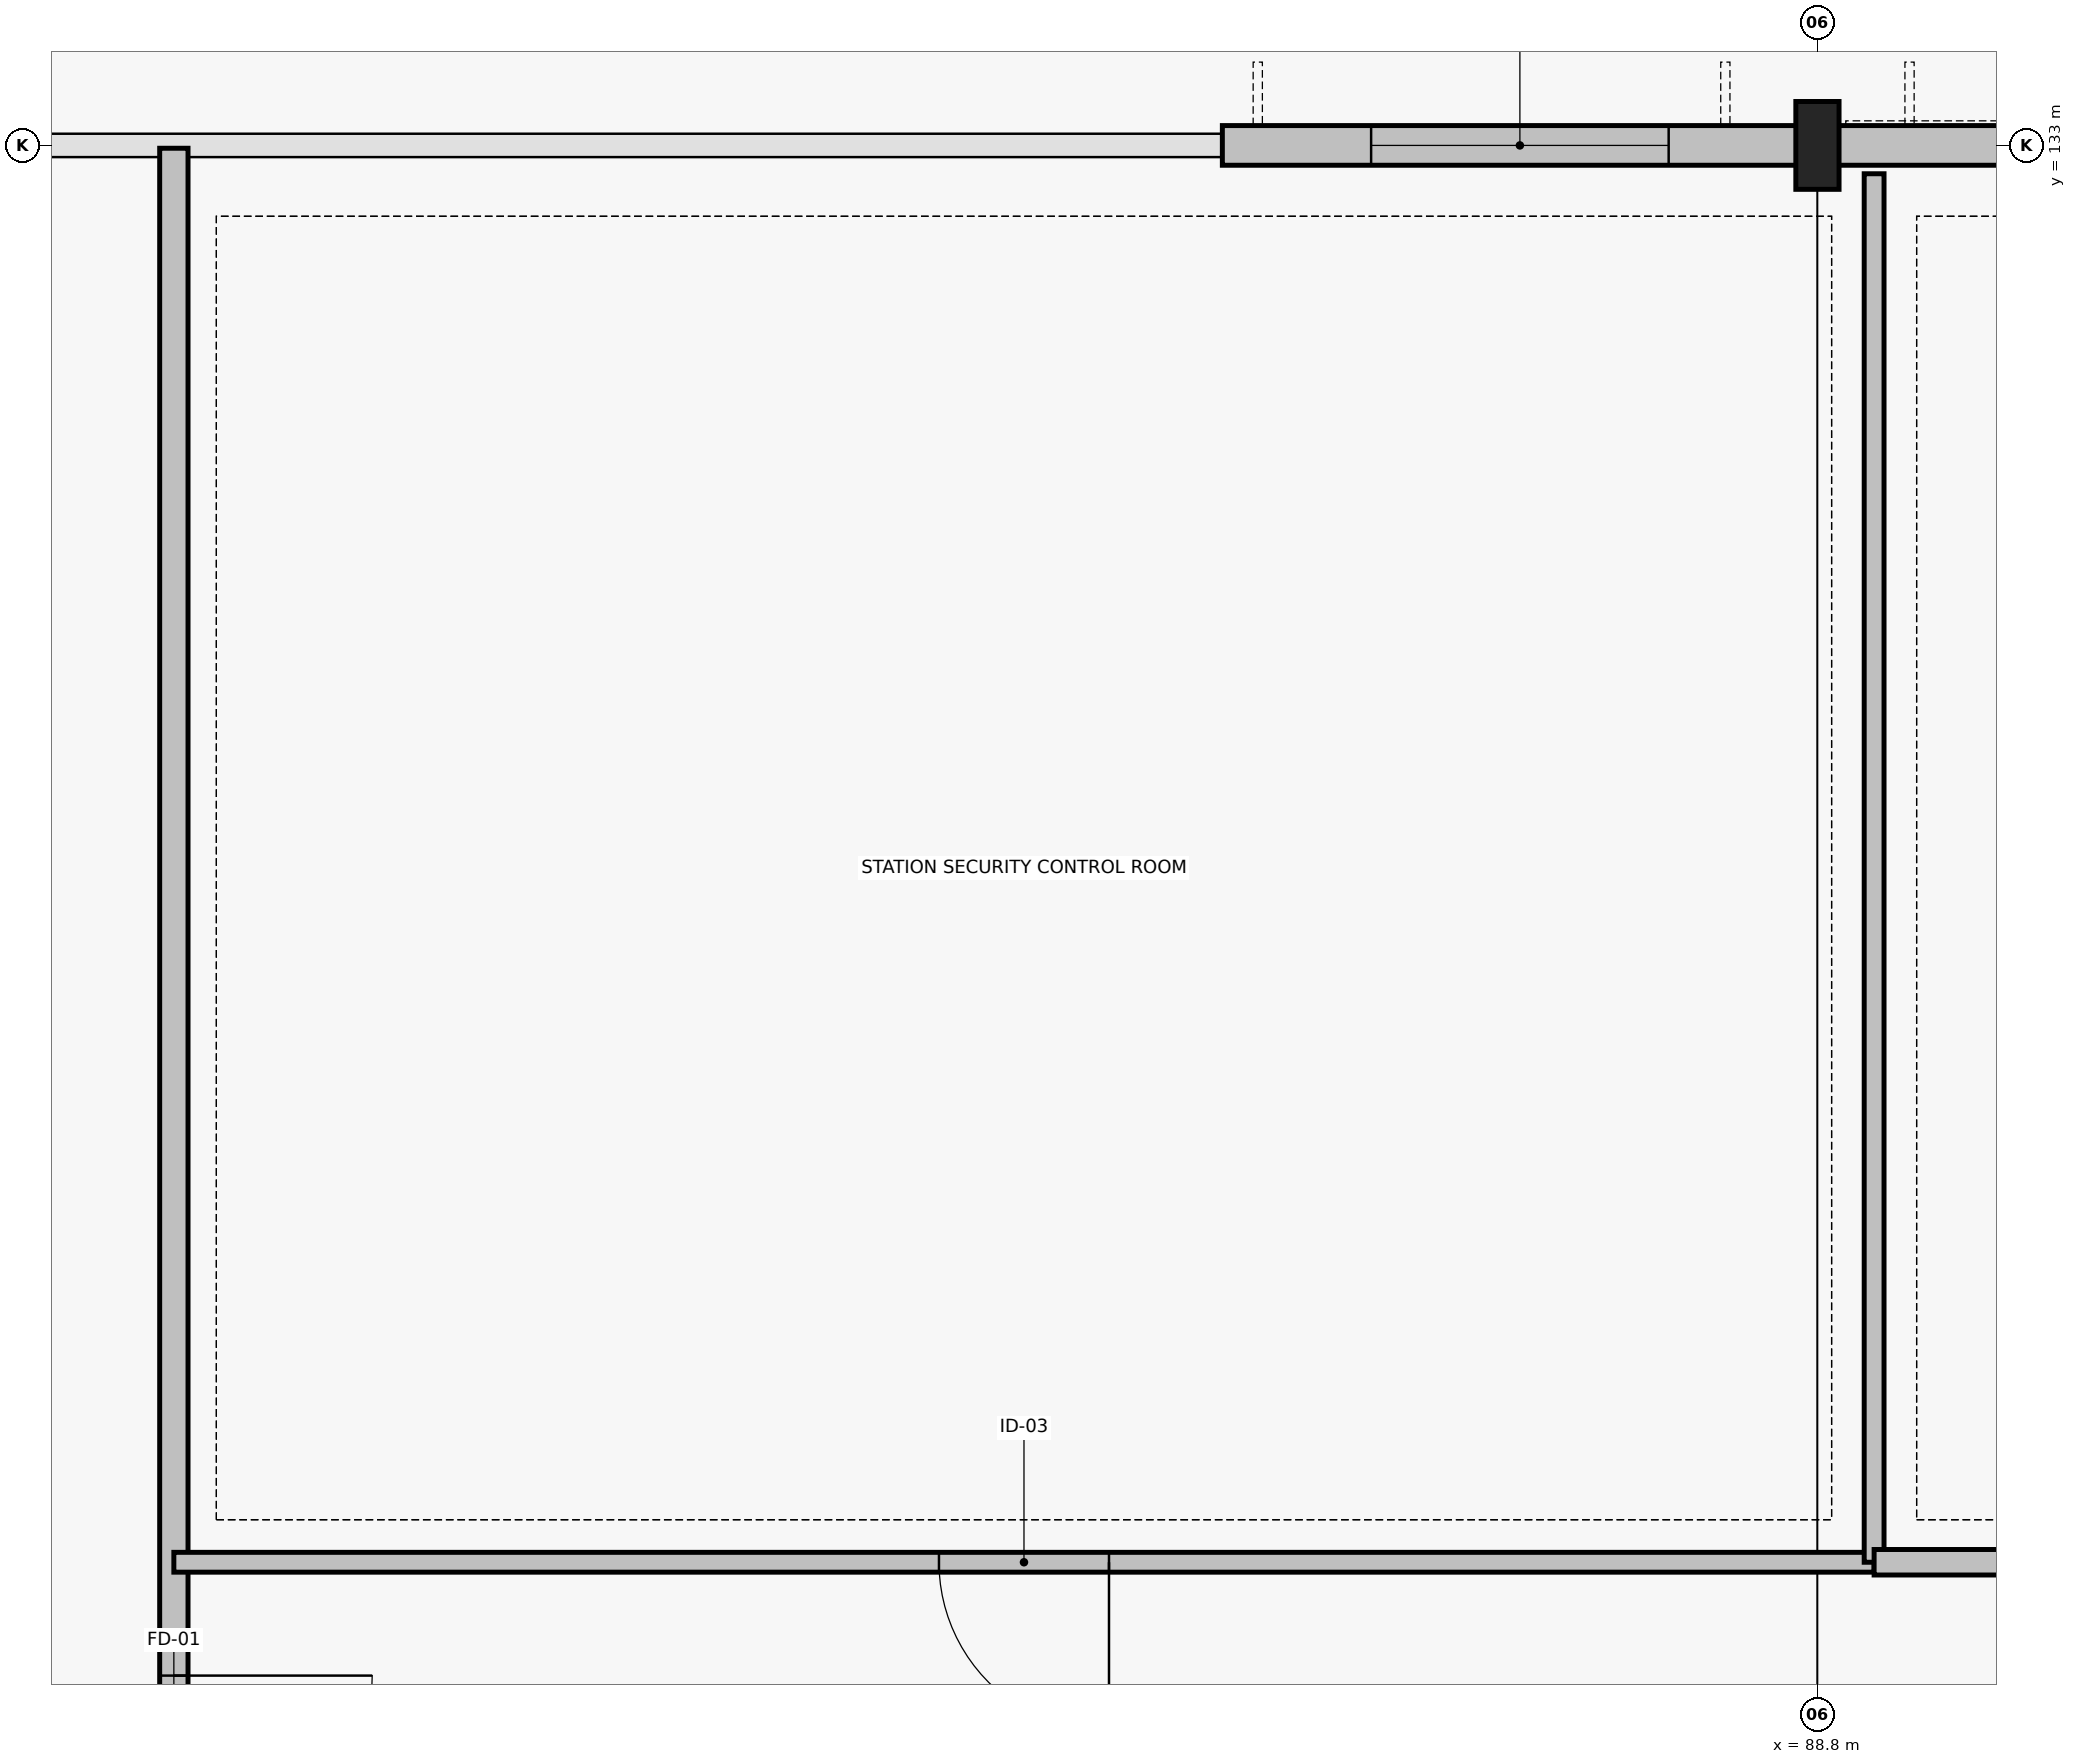
"""IFC4 building model, lengths in metres.
Left out: names, types, materials, properties, quantities, classifications, styles, units other than length and angle.
Written with IfcOpenShell. Run it as: python <this file> out.ifc"""

import sys

from ifc_helpers import new_model, si_unit, direction, frame, frame_2d, origin, origin_2d, place, context, subcontext, project, spatial, rectangle, i_section, extrude, element, fill, save


model = new_model("IFC4")
c1 = context("Model", 3, precision=1e-05, world=origin(), true_north=direction((0.0, 1.0)))
c2 = subcontext(c1, "Body", "Model", "MODEL_VIEW")
j1 = project(units=[si_unit("LENGTHUNIT", "METRE"), si_unit("PLANEANGLEUNIT", "RADIAN")], contexts=[c1])
p1 = place(None, origin())
s1 = spatial("IfcSite", under=j1, at=p1, CompositionType="ELEMENT")
p2 = place(p1, origin())
s2 = spatial("IfcBuilding", under=s1, at=p2, CompositionType="ELEMENT")
p3 = place(p2, origin())
s3 = spatial("IfcBuildingStorey", under=s2, at=p3, CompositionType="ELEMENT", Elevation=0.0)
p4 = place(p3, frame((88.8, 133.0, 0.0), z_axis=(0.0, 0.0, 1.0), x_axis=(1.0, 0.0, 0.0)))
e1 = element("IfcColumn", 1, at=p4, inside=s3, PredefinedType="COLUMN", context=c2, shape_type="SweptSolid", body=[
    extrude(i_section(OverallWidth=0.305, OverallDepth=0.62, WebThickness=0.021, FlangeThickness=0.04, FilletRadius=0.027, at=origin_2d()), origin(), (0.0, 0.0, 1.0), 5.4),
])
p5 = place(p3, frame((84.6, 133.0, 0.0), z_axis=(0.0, 0.0, 1.0), x_axis=(1.0, 0.0, 0.0)))
e2 = element("IfcWall", 2, at=p5, inside=s3, PredefinedType="STANDARD", context=c2, shape_type="SweptSolid", body=[
    extrude(rectangle(XDim=4.2, YDim=0.28, at=frame_2d((2.1, 0.0))), origin(), (0.0, 0.0, 1.0), 4.765),
])
p6 = place(p5, frame((1.05, 0.0, 0.8)))
e3 = element("IfcOpeningElement", 3, at=p6, cuts=e2, PredefinedType="OPENING", context=c2, shape_type="SweptSolid", body=[
    extrude(rectangle(XDim=2.1, YDim=2.05, at=frame_2d((1.05, 1.025))), frame((0.0, 0.15, 0.0), z_axis=(0.0, -1.0, 0.0), x_axis=(1.0, 0.0, 0.0)), (0.0, 0.0, 1.0), 0.3),
])
p7 = place(p3, frame((88.8, 133.0, 0.0), z_axis=(0.0, 0.0, 1.0), x_axis=(1.0, 0.0, 0.0)))
e4 = element("IfcWall", 4, at=p7, inside=s3, PredefinedType="STANDARD", context=c2, shape_type="SweptSolid", body=[
    extrude(rectangle(XDim=4.2, YDim=0.28, at=frame_2d((2.1, 0.0))), origin(), (0.0, 0.0, 1.0), 4.765),
])
p8 = place(p7, frame((1.4, 0.0, 0.0)))
e5 = element("IfcOpeningElement", 5, at=p8, cuts=e4, PredefinedType="OPENING", context=c2, shape_type="SweptSolid", body=[
    extrude(rectangle(XDim=1.8, YDim=2.3, at=frame_2d((0.9, 1.15))), frame((0.0, 0.15, 0.0), z_axis=(0.0, -1.0, 0.0), x_axis=(1.0, 0.0, 0.0)), (0.0, 0.0, 1.0), 0.3),
])
p9 = place(p3, frame((77.2, 109.6, 0.0), z_axis=(0.0, 0.0, 1.0), x_axis=(0.0, 1.0, 0.0)))
e6 = element("IfcWall", 6, at=p9, inside=s3, PredefinedType="PARTITIONING", context=c2, shape_type="SweptSolid", body=[
    extrude(rectangle(XDim=23.38, YDim=0.2, at=frame_2d((11.69, 0.0))), origin(), (0.0, 0.0, 1.0), 4.795),
])
p10 = place(p9, frame((11.2, 0.0, 0.0)))
e7 = element("IfcOpeningElement", 7, at=p10, cuts=e6, PredefinedType="OPENING", context=c2, shape_type="SweptSolid", body=[
    extrude(rectangle(XDim=1.4, YDim=2.2, at=frame_2d((0.7, 1.1))), frame((0.0, 0.11, 0.0), z_axis=(0.0, -1.0, 0.0), x_axis=(1.0, 0.0, 0.0)), (0.0, 0.0, 1.0), 0.22),
])
p11 = place(p3, frame((77.2, 123.0, 0.0), z_axis=(0.0, 0.0, 1.0), x_axis=(1.0, 0.0, 0.0)))
e8 = element("IfcWall", 8, at=p11, inside=s3, PredefinedType="PARTITIONING", context=c2, shape_type="SweptSolid", body=[
    extrude(rectangle(XDim=12.0, YDim=0.14, at=frame_2d((6.0, 0.0))), origin(), (0.0, 0.0, 1.0), 5.16),
])
p12 = place(p11, frame((5.4, 0.0, 0.0)))
e9 = element("IfcOpeningElement", 9, at=p12, cuts=e8, PredefinedType="OPENING", context=c2, shape_type="SweptSolid", body=[
    extrude(rectangle(XDim=1.2, YDim=2.2, at=frame_2d((0.6, 1.1))), frame((0.0, 0.08, 0.0), z_axis=(0.0, -1.0, 0.0), x_axis=(1.0, 0.0, 0.0)), (0.0, 0.0, 1.0), 0.16),
])
p13 = place(p3, frame((89.2, 123.0, 0.0), z_axis=(0.0, 0.0, 1.0), x_axis=(0.0, 1.0, 0.0)))
e10 = element("IfcWall", 10, at=p13, inside=s3, PredefinedType="PARTITIONING", context=c2, shape_type="SweptSolid", body=[
    extrude(rectangle(XDim=9.8, YDim=0.14, at=frame_2d((4.9, 0.0))), origin(), (0.0, 0.0, 1.0), 4.655),
])
p14 = place(p3, frame((89.2, 123.0, 0.0), z_axis=(0.0, 0.0, 1.0), x_axis=(1.0, 0.0, 0.0)))
e11 = element("IfcWall", 11, at=p14, inside=s3, PredefinedType="PARTITIONING", context=c2, shape_type="SweptSolid", body=[
    extrude(rectangle(XDim=8.0, YDim=0.18, at=frame_2d((4.0, 0.0))), origin(), (0.0, 0.0, 1.0), 5.16),
])
p15 = place(p14, frame((4.8, 0.0, 0.0), z_axis=(0.0, 0.0, 1.0), x_axis=(-1.0, 0.0, 0.0)))
e12 = element("IfcOpeningElement", 12, at=p15, cuts=e11, PredefinedType="OPENING", context=c2, shape_type="SweptSolid", body=[
    extrude(rectangle(XDim=1.6, YDim=2.25, at=frame_2d((0.8, 1.125))), frame((0.0, 0.1, 0.0), z_axis=(0.0, -1.0, 0.0), x_axis=(1.0, 0.0, 0.0)), (0.0, 0.0, 1.0), 0.2),
])
p16 = place(p6, origin())
e13 = element("IfcWindow", 13, at=p16, inside=s3, PartitioningType="SINGLE_PANEL", PredefinedType="WINDOW", context=c2, shape_type="SweptSolid", body=[
    extrude(rectangle(XDim=2.1, YDim=2.05, at=frame_2d((1.05, 1.025))), frame((0.0, 0.03, 0.0), z_axis=(0.0, -1.0, 0.0), x_axis=(1.0, 0.0, 0.0)), (0.0, 0.0, 1.0), 0.06),
])
fill(e3, e13)
p17 = place(p10, origin())
e14 = element("IfcDoor", 14, at=p17, inside=s3, OperationType="SINGLE_SWING_RIGHT", PredefinedType="DOOR", context=c2, shape_type="SweptSolid", body=[
    extrude(rectangle(XDim=1.4, YDim=2.2, at=frame_2d((0.7, 1.1))), frame((0.0, 0.025, 0.0), z_axis=(0.0, -1.0, 0.0), x_axis=(1.0, 0.0, 0.0)), (0.0, 0.0, 1.0), 0.05),
])
fill(e7, e14)
p18 = place(p12, origin())
e15 = element("IfcDoor", 15, at=p18, inside=s3, OperationType="SINGLE_SWING_RIGHT", PredefinedType="DOOR", context=c2, shape_type="SweptSolid", body=[
    extrude(rectangle(XDim=1.2, YDim=2.2, at=frame_2d((0.6, 1.1))), frame((0.0, 0.025, 0.0), z_axis=(0.0, -1.0, 0.0), x_axis=(1.0, 0.0, 0.0)), (0.0, 0.0, 1.0), 0.05),
])
fill(e9, e15)
save(model, sys.argv[1])
